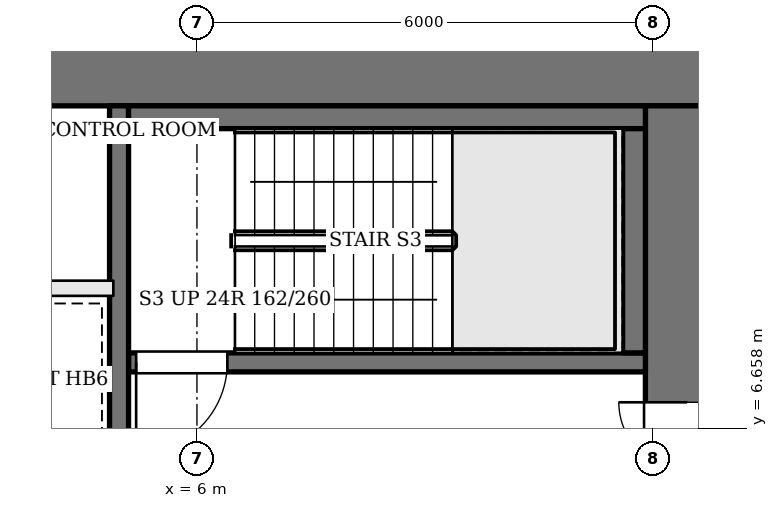
"""IFC4 building model, lengths in metres.
Left out: names, types, materials, properties, quantities, classifications, styles, units other than length and angle.
Written with IfcOpenShell. Run it as: python <this file> out.ifc"""

import sys

from ifc_helpers import new_model, si_unit, direction, frame, frame_2d, origin, place, context, subcontext, project, spatial, rectangle, extrude, element, fill, save


model = new_model("IFC4")
c1 = context("Model", 3, precision=1e-05, world=origin(), true_north=direction((0.0, 1.0)))
c2 = subcontext(c1, "Body", "Model", "MODEL_VIEW")
j1 = project(units=[si_unit("LENGTHUNIT", "METRE"), si_unit("PLANEANGLEUNIT", "RADIAN")], contexts=[c1])
p1 = place(None, origin())
s1 = spatial("IfcSite", under=j1, at=p1, CompositionType="ELEMENT")
p2 = place(p1, origin())
s2 = spatial("IfcBuilding", under=s1, at=p2, CompositionType="ELEMENT")
p3 = place(p2, frame((0.0, 0.0, 165.6)))
s3 = spatial("IfcBuildingStorey", under=s2, at=p3, CompositionType="ELEMENT", Elevation=165.6)
p4 = place(p3, frame((-13.0, 11.45, 0.0), z_axis=(0.0, 0.0, 1.0), x_axis=(1.0, 0.0, 0.0)))
e1 = element("IfcWall", 1, at=p4, inside=s3, PredefinedType="SHEAR", context=c2, shape_type="SweptSolid", body=[
    extrude(rectangle(XDim=26.0, YDim=1.1, at=frame_2d((13.0, 0.0))), origin(), (0.0, 0.0, 1.0), 3.9),
])
p5 = place(p4, frame((8.975, 0.0, 0.0)))
e2 = element("IfcOpeningElement", 2, at=p5, cuts=e1, PredefinedType="OPENING", context=c2, shape_type="SweptSolid", body=[
    extrude(rectangle(XDim=0.7, YDim=2.1, at=frame_2d((0.35, 1.05))), frame((0.0, 0.56, 0.0), z_axis=(0.0, -1.0, 0.0), x_axis=(1.0, 0.0, 0.0)), (0.0, 0.0, 1.0), 1.12),
])
p6 = place(p4, frame((11.025, 0.0, 0.0)))
e3 = element("IfcOpeningElement", 3, at=p6, cuts=e1, PredefinedType="OPENING", context=c2, shape_type="SweptSolid", body=[
    extrude(rectangle(XDim=0.7, YDim=2.1, at=frame_2d((0.35, 1.05))), frame((0.0, 0.56, 0.0), z_axis=(0.0, -1.0, 0.0), x_axis=(1.0, 0.0, 0.0)), (0.0, 0.0, 1.0), 1.12),
])
p7 = place(p4, frame((12.925, 0.0, 0.0)))
e4 = element("IfcOpeningElement", 4, at=p7, cuts=e1, PredefinedType="OPENING", context=c2, shape_type="SweptSolid", body=[
    extrude(rectangle(XDim=1.0, YDim=2.1, at=frame_2d((0.5, 1.05))), frame((0.0, 0.56, 0.0), z_axis=(0.0, -1.0, 0.0), x_axis=(1.0, 0.0, 0.0)), (0.0, 0.0, 1.0), 1.12),
])
p8 = place(p4, frame((15.775, 0.0, 0.0)))
e5 = element("IfcOpeningElement", 5, at=p8, cuts=e1, PredefinedType="OPENING", context=c2, shape_type="SweptSolid", body=[
    extrude(rectangle(XDim=1.0, YDim=2.1, at=frame_2d((0.5, 1.05))), frame((0.0, 0.56, 0.0), z_axis=(0.0, -1.0, 0.0), x_axis=(1.0, 0.0, 0.0)), (0.0, 0.0, 1.0), 1.12),
])
p9 = place(p3, frame((12.45, -1.9, 0.0), z_axis=(0.0, 0.0, 1.0), x_axis=(0.0, 1.0, 0.0)))
e6 = element("IfcWall", 6, at=p9, inside=s3, PredefinedType="SHEAR", context=c2, shape_type="SweptSolid", body=[
    extrude(rectangle(XDim=12.8, YDim=1.1, at=frame_2d((6.4, 0.0))), origin(), (0.0, 0.0, 1.0), 3.9),
])
p10 = place(p9, frame((7.1, 0.0, 0.0)))
e7 = element("IfcOpeningElement", 7, at=p10, cuts=e6, PredefinedType="OPENING", context=c2, shape_type="SweptSolid", body=[
    extrude(rectangle(XDim=1.8, YDim=2.1, at=frame_2d((0.9, 1.05))), frame((0.0, 0.56, 0.0), z_axis=(0.0, -1.0, 0.0), x_axis=(1.0, 0.0, 0.0)), (0.0, 0.0, 1.0), 1.12),
])
p11 = place(p3, frame((11.9, 7.525, 0.0), z_axis=(0.0, 0.0, 1.0), x_axis=(-1.0, 0.0, 0.0)))
e8 = element("IfcWall", 8, at=p11, inside=s3, PredefinedType="SOLIDWALL", context=c2, shape_type="SweptSolid", body=[
    extrude(rectangle(XDim=6.8, YDim=0.25, at=frame_2d((3.4, 0.0))), origin(), (0.0, 0.0, 1.0), 3.6),
])
p12 = place(p11, frame((5.5, 0.0, 0.0)))
e9 = element("IfcOpeningElement", 9, at=p12, cuts=e8, PredefinedType="OPENING", context=c2, shape_type="SweptSolid", body=[
    extrude(rectangle(XDim=1.2, YDim=2.1, at=frame_2d((0.6, 1.05))), frame((0.0, 0.135, 0.0), z_axis=(0.0, -1.0, 0.0), x_axis=(1.0, 0.0, 0.0)), (0.0, 0.0, 1.0), 0.27),
])
p13 = place(p3, frame((4.975, 10.9, 0.0), z_axis=(0.0, 0.0, 1.0), x_axis=(0.0, -1.0, 0.0)))
e10 = element("IfcWall", 10, at=p13, inside=s3, PredefinedType="SOLIDWALL", context=c2, shape_type="SweptSolid", body=[
    extrude(rectangle(XDim=12.8, YDim=0.25, at=frame_2d((6.4, 0.0))), origin(), (0.0, 0.0, 1.0), 3.6),
])
p14 = place(p13, frame((4.95, 0.0, 0.0)))
e11 = element("IfcOpeningElement", 11, at=p14, cuts=e10, PredefinedType="OPENING", context=c2, shape_type="SweptSolid", body=[
    extrude(rectangle(XDim=1.2, YDim=2.1, at=frame_2d((0.6, 1.05))), frame((0.0, 0.135, 0.0), z_axis=(0.0, -1.0, 0.0), x_axis=(1.0, 0.0, 0.0)), (0.0, 0.0, 1.0), 0.27),
])
p15 = place(p3, frame((11.9, 10.75, 0.0), z_axis=(0.0, 0.0, 1.0), x_axis=(-1.0, 0.0, 0.0)))
e12 = element("IfcWall", 12, at=p15, inside=s3, PredefinedType="SOLIDWALL", context=c2, shape_type="SweptSolid", body=[
    extrude(rectangle(XDim=6.8, YDim=0.3, at=frame_2d((3.4, 0.0))), origin(), (0.0, 0.0, 1.0), 3.6),
])
p16 = place(p3, frame((11.75, 10.6, 0.0), z_axis=(0.0, 0.0, 1.0), x_axis=(0.0, -1.0, 0.0)))
e13 = element("IfcWall", 13, at=p16, inside=s3, PredefinedType="SOLIDWALL", context=c2, shape_type="SweptSolid", body=[
    extrude(rectangle(XDim=2.95, YDim=0.3, at=frame_2d((1.475, 0.0))), origin(), (0.0, 0.0, 1.0), 3.6),
])
p17 = place(p3, frame((-4.9, 8.5, 0.0), z_axis=(0.0, 0.0, 1.0), x_axis=(1.0, 0.0, 0.0)))
e14 = element("IfcWall", 14, at=p17, inside=s3, PredefinedType="SOLIDWALL", context=c2, shape_type="SweptSolid", body=[
    extrude(rectangle(XDim=9.8, YDim=0.2, at=frame_2d((4.9, 0.0))), origin(), (0.0, 0.0, 1.0), 3.6),
])
p18 = place(p10, origin())
e15 = element("IfcDoor", 15, at=p18, inside=s3, OperationType="DOUBLE_DOOR_SINGLE_SWING", PredefinedType="DOOR", context=c2, shape_type="SweptSolid", body=[
    extrude(rectangle(XDim=1.8, YDim=2.1, at=frame_2d((0.9, 1.05))), frame((0.0, 0.025, 0.0), z_axis=(0.0, -1.0, 0.0), x_axis=(1.0, 0.0, 0.0)), (0.0, 0.0, 1.0), 0.05),
])
fill(e7, e15)
p19 = place(p12, origin())
e16 = element("IfcDoor", 16, at=p19, inside=s3, OperationType="SINGLE_SWING_RIGHT", PredefinedType="DOOR", context=c2, shape_type="SweptSolid", body=[
    extrude(rectangle(XDim=1.2, YDim=2.1, at=frame_2d((0.6, 1.05))), frame((0.0, 0.025, 0.0), z_axis=(0.0, -1.0, 0.0), x_axis=(1.0, 0.0, 0.0)), (0.0, 0.0, 1.0), 0.05),
])
fill(e9, e16)
save(model, sys.argv[1])
